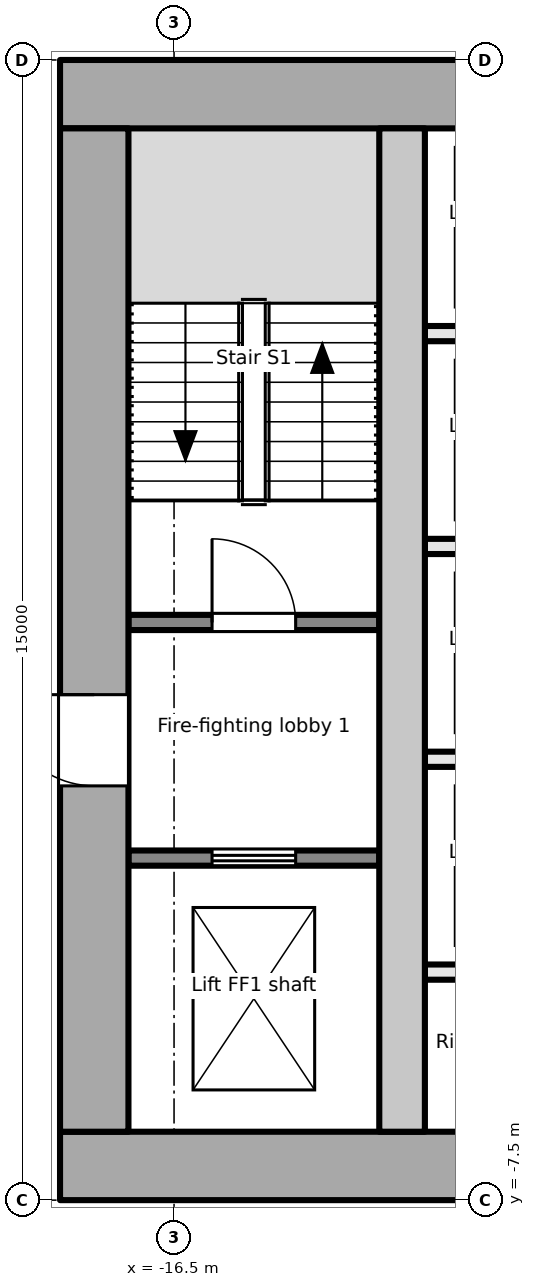
"""IFC4 building model, lengths in metres.
Left out: names, types, materials, properties, quantities, classifications, styles, units other than length and angle.
Written with IfcOpenShell. Run it as: python <this file> out.ifc"""

import sys

from ifc_helpers import new_model, si_unit, direction, frame, frame_2d, origin, place, context, subcontext, project, spatial, rectangle, extrude, element, fill, save


model = new_model("IFC4")
c1 = context("Model", 3, precision=1e-05, world=origin(), true_north=direction((0.0, 1.0)))
c2 = subcontext(c1, "Body", "Model", "MODEL_VIEW")
j1 = project(units=[si_unit("LENGTHUNIT", "METRE"), si_unit("PLANEANGLEUNIT", "RADIAN")], contexts=[c1])
p1 = place(None, origin())
s1 = spatial("IfcSite", under=j1, at=p1, CompositionType="ELEMENT")
p2 = place(p1, origin())
s2 = spatial("IfcBuilding", under=s1, at=p2, CompositionType="ELEMENT")
p3 = place(p2, frame((0.0, 0.0, 79.7)))
s3 = spatial("IfcBuildingStorey", under=s2, at=p3, CompositionType="ELEMENT", Elevation=79.7)
p4 = place(p3, frame((-18.0, -7.05, -0.2), z_axis=(0.0, 0.0, 1.0), x_axis=(1.0, 0.0, 0.0)))
e1 = element("IfcWall", 1, at=p4, inside=s3, PredefinedType="SHEAR", context=c2, shape_type="SweptSolid", body=[
    extrude(rectangle(XDim=36.0, YDim=0.9, at=frame_2d((18.0, 0.0))), origin(), (0.0, 0.0, 1.0), 4.0),
])
p5 = place(p4, frame((7.8, 0.0, 0.2)))
e2 = element("IfcOpeningElement", 2, at=p5, cuts=e1, PredefinedType="OPENING", context=c2, shape_type="SweptSolid", body=[
    extrude(rectangle(XDim=2.4, YDim=2.1, at=frame_2d((1.2, 1.05))), frame((0.0, 0.46, 0.0), z_axis=(0.0, -1.0, 0.0), x_axis=(1.0, 0.0, 0.0)), (0.0, 0.0, 1.0), 0.921),
])
p6 = place(p4, frame((17.4, 0.0, 0.2)))
e3 = element("IfcOpeningElement", 3, at=p6, cuts=e1, PredefinedType="OPENING", context=c2, shape_type="SweptSolid", body=[
    extrude(rectangle(XDim=1.2, YDim=2.1, at=frame_2d((0.6, 1.05))), frame((0.0, 0.46, 0.0), z_axis=(0.0, -1.0, 0.0), x_axis=(1.0, 0.0, 0.0)), (0.0, 0.0, 1.0), 0.921),
])
p7 = place(p4, frame((26.1, 0.0, 0.2)))
e4 = element("IfcOpeningElement", 4, at=p7, cuts=e1, PredefinedType="OPENING", context=c2, shape_type="SweptSolid", body=[
    extrude(rectangle(XDim=2.4, YDim=2.1, at=frame_2d((1.2, 1.05))), frame((0.0, 0.46, 0.0), z_axis=(0.0, -1.0, 0.0), x_axis=(1.0, 0.0, 0.0)), (0.0, 0.0, 1.0), 0.921),
])
p8 = place(p3, frame((-18.0, 7.05, -0.2), z_axis=(0.0, 0.0, 1.0), x_axis=(1.0, 0.0, 0.0)))
e5 = element("IfcWall", 5, at=p8, inside=s3, PredefinedType="SHEAR", context=c2, shape_type="SweptSolid", body=[
    extrude(rectangle(XDim=36.0, YDim=0.9, at=frame_2d((18.0, 0.0))), origin(), (0.0, 0.0, 1.0), 4.0),
])
p9 = place(p3, frame((-17.55, -6.6, -0.2), z_axis=(0.0, 0.0, 1.0), x_axis=(0.0, 1.0, 0.0)))
e6 = element("IfcWall", 6, at=p9, inside=s3, PredefinedType="SHEAR", context=c2, shape_type="SweptSolid", body=[
    extrude(rectangle(XDim=13.2, YDim=0.9, at=frame_2d((6.6, 0.0))), origin(), (0.0, 0.0, 1.0), 4.0),
])
p10 = place(p9, frame((4.55, 0.0, 0.2)))
e7 = element("IfcOpeningElement", 7, at=p10, cuts=e6, PredefinedType="OPENING", context=c2, shape_type="SweptSolid", body=[
    extrude(rectangle(XDim=1.2, YDim=2.1, at=frame_2d((0.6, 1.05))), frame((0.0, 0.46, 0.0), z_axis=(0.0, -1.0, 0.0), x_axis=(1.0, 0.0, 0.0)), (0.0, 0.0, 1.0), 0.921),
])
p11 = place(p3, frame((-13.5, -6.6, -0.2), z_axis=(0.0, 0.0, 1.0), x_axis=(0.0, 1.0, 0.0)))
e8 = element("IfcWall", 8, at=p11, inside=s3, PredefinedType="SHEAR", context=c2, shape_type="SweptSolid", body=[
    extrude(rectangle(XDim=13.2, YDim=0.6, at=frame_2d((6.6, 0.0))), origin(), (0.0, 0.0, 1.0), 4.0),
])
p12 = place(p3, frame((-17.1, -3.0, 0.0), z_axis=(0.0, 0.0, 1.0), x_axis=(1.0, 0.0, 0.0)))
e9 = element("IfcWall", 9, at=p12, inside=s3, PredefinedType="PARTITIONING", context=c2, shape_type="SweptSolid", body=[
    extrude(rectangle(XDim=3.3, YDim=0.2, at=frame_2d((1.65, 0.0))), origin(), (0.0, 0.0, 1.0), 3.8),
])
p13 = place(p12, frame((1.1, 0.0, 0.0)))
e10 = element("IfcOpeningElement", 10, at=p13, cuts=e9, PredefinedType="OPENING", context=c2, shape_type="SweptSolid", body=[
    extrude(rectangle(XDim=1.1, YDim=2.1, at=frame_2d((0.55, 1.05))), frame((0.0, 0.111, 0.0), z_axis=(0.0, -1.0, 0.0), x_axis=(1.0, 0.0, 0.0)), (0.0, 0.0, 1.0), 0.221),
])
p14 = place(p3, frame((-17.1, 0.1, 0.0), z_axis=(0.0, 0.0, 1.0), x_axis=(1.0, 0.0, 0.0)))
e11 = element("IfcWall", 11, at=p14, inside=s3, PredefinedType="PARTITIONING", context=c2, shape_type="SweptSolid", body=[
    extrude(rectangle(XDim=3.3, YDim=0.2, at=frame_2d((1.65, 0.0))), origin(), (0.0, 0.0, 1.0), 3.8),
])
p15 = place(p14, frame((1.1, 0.0, 0.0)))
e12 = element("IfcOpeningElement", 12, at=p15, cuts=e11, PredefinedType="OPENING", context=c2, shape_type="SweptSolid", body=[
    extrude(rectangle(XDim=1.1, YDim=2.1, at=frame_2d((0.55, 1.05))), frame((0.0, 0.111, 0.0), z_axis=(0.0, -1.0, 0.0), x_axis=(1.0, 0.0, 0.0)), (0.0, 0.0, 1.0), 0.221),
])
for number, where, z_axis, x_axis in (
    (13, (-13.2, -1.7, 0.0), (0.0, 0.0, 1.0), (1.0, 0.0, 0.0)),
    (14, (-13.2, 1.1, 0.0), (0.0, 0.0, 1.0), (1.0, 0.0, 0.0)),
    (15, (-13.2, 3.9, 0.0), (0.0, 0.0, 1.0), (1.0, 0.0, 0.0)),
    (16, (-13.2, -4.5, 0.0), (0.0, 0.0, 1.0), (1.0, 0.0, 0.0)),
):
    element("IfcWall", number, at=place(p3, frame(where, z_axis=z_axis, x_axis=x_axis)), inside=s3, PredefinedType="PARTITIONING", context=c2, shape_type="SweptSolid", body=[
        extrude(rectangle(XDim=2.3, YDim=0.2, at=frame_2d((1.15, 0.0))), origin(), (0.0, 0.0, 1.0), 3.8),
    ])
p16 = place(p13, origin())
e17 = element("IfcDoor", 17, at=p16, inside=s3, OperationType="DOUBLE_DOOR_SLIDING", PredefinedType="DOOR", context=c2, shape_type="SweptSolid", body=[
    extrude(rectangle(XDim=1.1, YDim=2.1, at=frame_2d((0.55, 1.05))), frame((0.0, 0.025, 0.0), z_axis=(0.0, -1.0, 0.0), x_axis=(1.0, 0.0, 0.0)), (0.0, 0.0, 1.0), 0.05),
])
fill(e10, e17)
p17 = place(p10, origin())
e18 = element("IfcDoor", 18, at=p17, inside=s3, OperationType="SINGLE_SWING_RIGHT", PredefinedType="DOOR", context=c2, shape_type="SweptSolid", body=[
    extrude(rectangle(XDim=1.2, YDim=2.1, at=frame_2d((0.6, 1.05))), frame((0.0, 0.025, 0.0), z_axis=(0.0, -1.0, 0.0), x_axis=(1.0, 0.0, 0.0)), (0.0, 0.0, 1.0), 0.05),
])
fill(e7, e18)
p18 = place(p15, origin())
e19 = element("IfcDoor", 19, at=p18, inside=s3, OperationType="SINGLE_SWING_LEFT", PredefinedType="DOOR", context=c2, shape_type="SweptSolid", body=[
    extrude(rectangle(XDim=1.1, YDim=2.1, at=frame_2d((0.55, 1.05))), frame((0.0, 0.025, 0.0), z_axis=(0.0, -1.0, 0.0), x_axis=(1.0, 0.0, 0.0)), (0.0, 0.0, 1.0), 0.05),
])
fill(e12, e19)
save(model, sys.argv[1])
